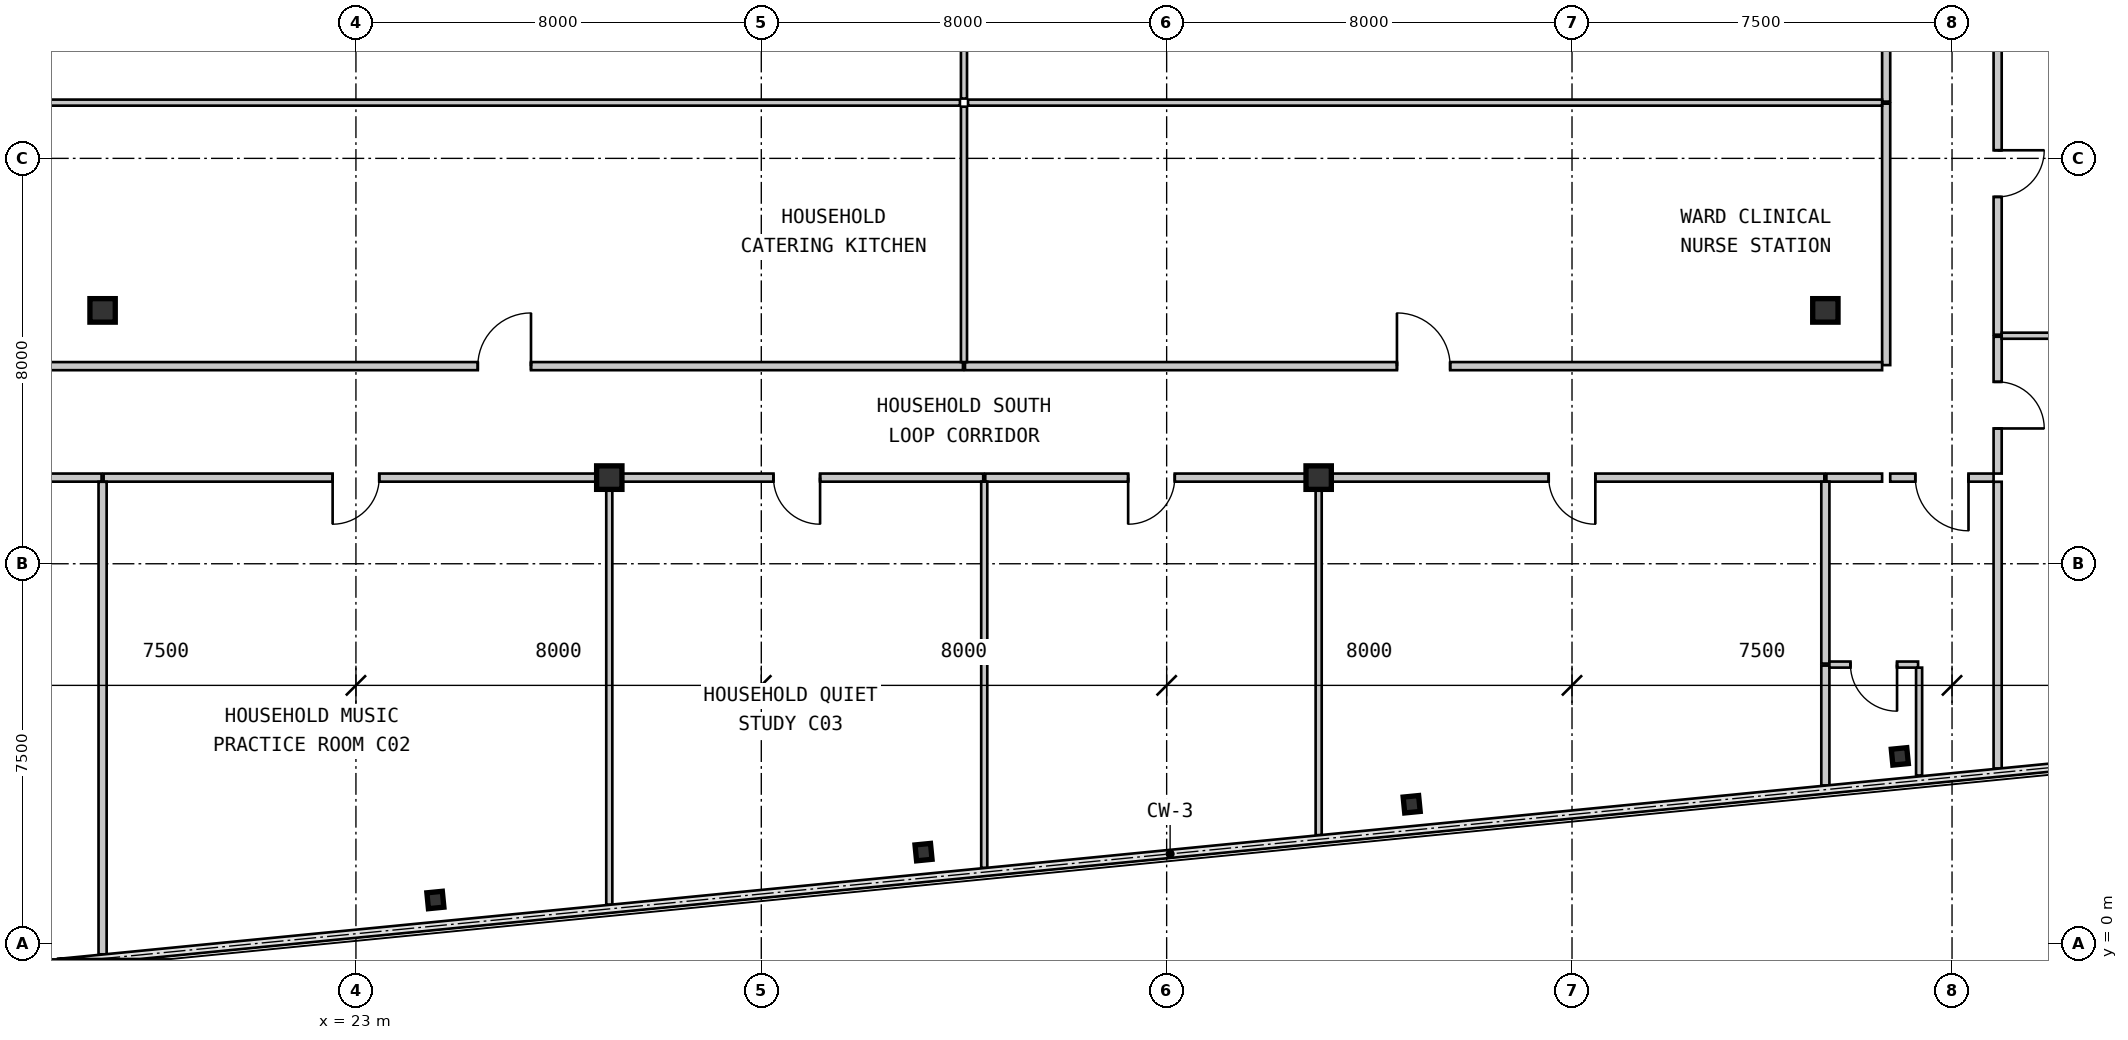
"""IFC4 building model, lengths in metres.
Left out: names, types, materials, properties, quantities, classifications, styles, units other than length and angle.
Written with IfcOpenShell. Run it as: python <this file> out.ifc"""

import sys

from ifc_helpers import new_model, si_unit, direction, frame, frame_2d, origin, origin_2d, place, context, subcontext, project, spatial, rectangle, i_section, extrude, source, transform, mapped, element, fill, save


model = new_model("IFC4")
c1 = context("Model", 3, precision=1e-05, world=origin(), true_north=direction((0.0, 1.0)))
c2 = subcontext(c1, "Body", "Model", "MODEL_VIEW")
j1 = project(units=[si_unit("LENGTHUNIT", "METRE"), si_unit("PLANEANGLEUNIT", "RADIAN")], contexts=[c1])
p1 = place(None, origin())
s1 = spatial("IfcSite", under=j1, at=p1, CompositionType="ELEMENT")
p2 = place(p1, origin())
s2 = spatial("IfcBuilding", under=s1, at=p2, CompositionType="ELEMENT")
p3 = place(p2, frame((0.0, 0.0, 74.55)))
s3 = spatial("IfcBuildingStorey", under=s2, at=p3, CompositionType="ELEMENT", Elevation=74.55)
m1 = source(origin(), c2, "Body", "SweptSolid", [
    extrude(i_section(OverallWidth=0.5, OverallDepth=0.464, WebThickness=0.022, FlangeThickness=0.034, at=origin_2d()), origin(), (0.0, 0.0, 1.0), 3.15),
])
for number, where, z_axis, x_axis in (
    (1, (28.0, 9.2, 0.0), (0.0, 0.0, 1.0), (1.0, 0.0, 0.0)),
    (2, (42.0, 9.2, 0.0), (0.0, 0.0, 1.0), (1.0, 0.0, 0.0)),
    (3, (18.0, 12.5, 0.0), (0.0, 0.0, 1.0), (1.0, 0.0, 0.0)),
    (4, (52.0, 12.5, 0.0), (0.0, 0.0, 1.0), (1.0, 0.0, 0.0)),
):
    element("IfcColumn", number, at=place(p3, frame(where, z_axis=z_axis, x_axis=x_axis)), inside=s3, PredefinedType="COLUMN", context=c2, shape_type="MappedRepresentation", body=[
        mapped(m1, transform((0.0, 0.0, 0.0), scale=1.0)),
    ])
m2 = source(origin(), c2, "Body", "SweptSolid", [
    extrude(i_section(OverallWidth=0.307, OverallDepth=0.315, WebThickness=0.012, FlangeThickness=0.019, at=origin_2d()), origin(), (0.0, 0.0, 1.0), 3.15),
])
for number, where, z_axis, x_axis in (
    (5, (24.568, 0.865, 0.0), (0.0, 0.0, 1.0), (0.995, 0.098, 0.0)),
    (6, (34.202, 1.809, 0.0), (0.0, 0.0, 1.0), (0.995, 0.098, 0.0)),
    (7, (43.835, 2.754, 0.0), (0.0, 0.0, 1.0), (0.995, 0.098, 0.0)),
    (8, (53.469, 3.698, 0.0), (0.0, 0.0, 1.0), (0.995, 0.098, 0.0)),
):
    element("IfcColumn", number, at=place(p3, frame(where, z_axis=z_axis, x_axis=x_axis)), inside=s3, PredefinedType="COLUMN", context=c2, shape_type="MappedRepresentation", body=[
        mapped(m2, transform((0.0, 0.0, 0.0), scale=1.0)),
    ])
m3 = source(origin(), c2, "Body", "SweptSolid", [
    extrude(rectangle(XDim=5.16, YDim=0.16, at=frame_2d((2.58, 0.0))), origin(), (0.0, 0.0, 1.0), 2.93),
])
p4 = place(p3, frame((53.2, 11.42, 0.0), z_axis=(0.0, 0.0, 1.0), x_axis=(0.0, 1.0, 0.0)))
e9 = element("IfcWall", 9, at=p4, inside=s3, PredefinedType="PARTITIONING", context=c2, shape_type="MappedRepresentation", body=[
    mapped(m3, transform((0.0, 0.0, 0.0), scale=1.0)),
])
m4 = source(origin(), c2, "Body", "SweptSolid", [
    extrude(rectangle(XDim=5.1, YDim=0.16, at=frame_2d((2.55, 0.0))), origin(), (0.0, 0.0, 1.0), 2.93),
])
p5 = place(p3, frame((53.2, 16.62, 0.0), z_axis=(0.0, 0.0, 1.0), x_axis=(0.0, 1.0, 0.0)))
e10 = element("IfcWall", 10, at=p5, inside=s3, PredefinedType="PARTITIONING", context=c2, shape_type="MappedRepresentation", body=[
    mapped(m4, transform((0.0, 0.0, 0.0), scale=1.0)),
])
m5 = source(origin(), c2, "Body", "SweptSolid", [
    extrude(rectangle(XDim=2.04, YDim=0.16, at=frame_2d((1.02, 0.0))), origin(), (0.0, 0.0, 1.0), 2.93),
])
p6 = place(p3, frame((55.32, 9.2, 0.0), z_axis=(0.0, 0.0, 1.0), x_axis=(-1.0, 0.0, 0.0)))
e11 = element("IfcWall", 11, at=p6, inside=s3, PredefinedType="PARTITIONING", context=c2, shape_type="MappedRepresentation", body=[
    mapped(m5, transform((0.0, 0.0, 0.0), scale=1.0)),
])
m6 = source(origin(), c2, "Body", "SweptSolid", [
    extrude(rectangle(XDim=1.05, YDim=2.1, at=frame_2d((0.525, 1.05))), frame((0.0, 0.09, 0.0), z_axis=(0.0, -1.0, 0.0), x_axis=(1.0, 0.0, 0.0)), (0.0, 0.0, 1.0), 0.18),
])
p7 = place(p6, frame((0.495, 0.0, 0.0)))
e12 = element("IfcOpeningElement", 12, at=p7, cuts=e11, PredefinedType="OPENING", context=c2, shape_type="MappedRepresentation", body=[
    mapped(m6, transform((0.0, 0.0, 0.0), scale=1.0)),
])
m7 = source(origin(), c2, "Body", "SweptSolid", [
    extrude(rectangle(XDim=2.7, YDim=0.16, at=frame_2d((1.35, 0.0))), origin(), (0.0, 0.0, 1.0), 2.93),
])
p8 = place(p3, frame((55.4, 11.98, 0.0), z_axis=(0.0, 0.0, 1.0), x_axis=(0.0, -1.0, 0.0)))
e13 = element("IfcWall", 13, at=p8, inside=s3, PredefinedType="PARTITIONING", context=c2, shape_type="MappedRepresentation", body=[
    mapped(m7, transform((0.0, 0.0, 0.0), scale=1.0)),
])
m8 = source(origin(), c2, "Body", "SweptSolid", [
    extrude(rectangle(XDim=0.92, YDim=2.1, at=frame_2d((0.46, 1.05))), frame((0.0, 0.09, 0.0), z_axis=(0.0, -1.0, 0.0), x_axis=(1.0, 0.0, 0.0)), (0.0, 0.0, 1.0), 0.18),
])
p9 = place(p8, frame((0.89, 0.0, 0.0)))
e14 = element("IfcOpeningElement", 14, at=p9, cuts=e13, PredefinedType="OPENING", context=c2, shape_type="MappedRepresentation", body=[
    mapped(m8, transform((0.0, 0.0, 0.0), scale=1.0)),
])
m9 = source(origin(), c2, "Body", "SweptSolid", [
    extrude(rectangle(XDim=6.36, YDim=0.16, at=frame_2d((3.18, 0.0))), origin(), (0.0, 0.0, 1.0), 2.93),
])
p10 = place(p3, frame((55.4, 18.38, 0.0), z_axis=(0.0, 0.0, 1.0), x_axis=(0.0, -1.0, 0.0)))
e15 = element("IfcWall", 15, at=p10, inside=s3, PredefinedType="PARTITIONING", context=c2, shape_type="MappedRepresentation", body=[
    mapped(m9, transform((0.0, 0.0, 0.0), scale=1.0)),
])
p11 = place(p10, frame((2.72, 0.0, 0.0)))
e16 = element("IfcOpeningElement", 16, at=p11, cuts=e15, PredefinedType="OPENING", context=c2, shape_type="MappedRepresentation", body=[
    mapped(m8, transform((0.0, 0.0, 0.0), scale=1.0)),
])
m10 = source(origin(), c2, "Body", "SweptSolid", [
    extrude(rectangle(XDim=18.1, YDim=0.16, at=frame_2d((9.05, 0.0))), origin(), (0.0, 0.0, 1.0), 2.93),
])
p12 = place(p3, frame((16.88, 11.4, 0.0), z_axis=(0.0, 0.0, 1.0), x_axis=(1.0, 0.0, 0.0)))
e17 = element("IfcWall", 17, at=p12, inside=s3, PredefinedType="PARTITIONING", context=c2, shape_type="MappedRepresentation", body=[
    mapped(m10, transform((0.0, 0.0, 0.0), scale=1.0)),
])
p13 = place(p12, frame((8.525, 0.0, 0.0)))
e18 = element("IfcOpeningElement", 18, at=p13, cuts=e17, PredefinedType="OPENING", context=c2, shape_type="MappedRepresentation", body=[
    mapped(m6, transform((0.0, 0.0, 0.0), scale=1.0)),
])
p14 = place(p3, frame((35.02, 11.4, 0.0), z_axis=(0.0, 0.0, 1.0), x_axis=(1.0, 0.0, 0.0)))
e19 = element("IfcWall", 19, at=p14, inside=s3, PredefinedType="PARTITIONING", context=c2, shape_type="MappedRepresentation", body=[
    mapped(m10, transform((0.0, 0.0, 0.0), scale=1.0)),
])
p15 = place(p14, frame((8.525, 0.0, 0.0)))
e20 = element("IfcOpeningElement", 20, at=p15, cuts=e19, PredefinedType="OPENING", context=c2, shape_type="MappedRepresentation", body=[
    mapped(m6, transform((0.0, 0.0, 0.0), scale=1.0)),
])
m11 = source(origin(), c2, "Body", "SweptSolid", [
    extrude(rectangle(XDim=1.1, YDim=0.16, at=frame_2d((0.55, 0.0))), origin(), (0.0, 0.0, 1.0), 2.93),
])
p16 = place(p3, frame((17.98, 9.2, 0.0), z_axis=(0.0, 0.0, 1.0), x_axis=(-1.0, 0.0, 0.0)))
e21 = element("IfcWall", 21, at=p16, inside=s3, PredefinedType="PARTITIONING", context=c2, shape_type="MappedRepresentation", body=[
    mapped(m11, transform((0.0, 0.0, 0.0), scale=1.0)),
])
m12 = source(origin(), c2, "Body", "SweptSolid", [
    extrude(rectangle(XDim=9.959, YDim=0.16, at=frame_2d((4.98, 0.0))), origin(), (0.0, 0.0, 1.0), 2.93),
])
p17 = place(p3, frame((27.98, 9.2, 0.0), z_axis=(0.0, 0.0, 1.0), x_axis=(-1.0, 0.0, 0.0)))
e22 = element("IfcWall", 22, at=p17, inside=s3, PredefinedType="PARTITIONING", context=c2, shape_type="MappedRepresentation", body=[
    mapped(m12, transform((0.0, 0.0, 0.0), scale=1.0)),
])
p18 = place(p17, frame((4.52, 0.0, 0.0)))
e23 = element("IfcOpeningElement", 23, at=p18, cuts=e22, PredefinedType="OPENING", context=c2, shape_type="MappedRepresentation", body=[
    mapped(m8, transform((0.0, 0.0, 0.0), scale=1.0)),
])
m13 = source(origin(), c2, "Body", "SweptSolid", [
    extrude(rectangle(XDim=7.36, YDim=0.16, at=frame_2d((3.68, 0.0))), origin(), (0.0, 0.0, 1.0), 2.328),
])
p19 = place(p3, frame((35.38, 9.2, 0.0), z_axis=(0.0, 0.0, 1.0), x_axis=(-1.0, 0.0, 0.0)))
e24 = element("IfcWall", 24, at=p19, inside=s3, PredefinedType="PARTITIONING", context=c2, shape_type="MappedRepresentation", body=[
    mapped(m13, transform((0.0, 0.0, 0.0), scale=1.0)),
])
p20 = place(p19, frame((3.22, 0.0, 0.0)))
e25 = element("IfcOpeningElement", 25, at=p20, cuts=e24, PredefinedType="OPENING", context=c2, shape_type="MappedRepresentation", body=[
    mapped(m8, transform((0.0, 0.0, 0.0), scale=1.0)),
])
m14 = source(origin(), c2, "Body", "SweptSolid", [
    extrude(rectangle(XDim=6.56, YDim=0.16, at=frame_2d((3.28, 0.0))), origin(), (0.0, 0.0, 1.0), 2.328),
])
p21 = place(p3, frame((41.98, 9.2, 0.0), z_axis=(0.0, 0.0, 1.0), x_axis=(-1.0, 0.0, 0.0)))
e26 = element("IfcWall", 26, at=p21, inside=s3, PredefinedType="PARTITIONING", context=c2, shape_type="MappedRepresentation", body=[
    mapped(m14, transform((0.0, 0.0, 0.0), scale=1.0)),
])
p22 = place(p21, frame((2.82, 0.0, 0.0)))
e27 = element("IfcOpeningElement", 27, at=p22, cuts=e26, PredefinedType="OPENING", context=c2, shape_type="MappedRepresentation", body=[
    mapped(m8, transform((0.0, 0.0, 0.0), scale=1.0)),
])
p23 = place(p3, frame((51.98, 9.2, 0.0), z_axis=(0.0, 0.0, 1.0), x_axis=(-1.0, 0.0, 0.0)))
e28 = element("IfcWall", 28, at=p23, inside=s3, PredefinedType="PARTITIONING", context=c2, shape_type="MappedRepresentation", body=[
    mapped(m12, transform((0.0, 0.0, 0.0), scale=1.0)),
])
p24 = place(p23, frame((4.52, 0.0, 0.0)))
e29 = element("IfcOpeningElement", 29, at=p24, cuts=e28, PredefinedType="OPENING", context=c2, shape_type="MappedRepresentation", body=[
    mapped(m8, transform((0.0, 0.0, 0.0), scale=1.0)),
])
p25 = place(p3, frame((53.12, 9.2, 0.0), z_axis=(0.0, 0.0, 1.0), x_axis=(-1.0, 0.0, 0.0)))
e30 = element("IfcWall", 30, at=p25, inside=s3, PredefinedType="PARTITIONING", context=c2, shape_type="MappedRepresentation", body=[
    mapped(m11, transform((0.0, 0.0, 0.0), scale=1.0)),
])
m15 = source(origin(), c2, "Body", "SweptSolid", [
    extrude(rectangle(XDim=18.04, YDim=0.12, at=frame_2d((9.02, 0.0))), origin(), (0.0, 0.0, 1.0), 2.93),
])
p26 = place(p3, frame((16.88, 16.6, 0.0), z_axis=(0.0, 0.0, 1.0), x_axis=(1.0, 0.0, 0.0)))
e31 = element("IfcWall", 31, at=p26, inside=s3, PredefinedType="PARTITIONING", context=c2, shape_type="MappedRepresentation", body=[
    mapped(m15, transform((0.0, 0.0, 0.0), scale=1.0)),
])
m16 = source(origin(), c2, "Body", "SweptSolid", [
    extrude(rectangle(XDim=5.04, YDim=0.12, at=frame_2d((2.52, 0.0))), origin(), (0.0, 0.0, 1.0), 2.93),
])
for number, where, z_axis, x_axis in (
    (32, (35.0, 16.52, 0.0), (0.0, 0.0, 1.0), (0.0, -1.0, 0.0)),
    (33, (35.0, 21.72, 0.0), (0.0, 0.0, 1.0), (0.0, -1.0, 0.0)),
):
    element("IfcWall", number, at=place(p3, frame(where, z_axis=z_axis, x_axis=x_axis)), inside=s3, PredefinedType="PARTITIONING", context=c2, shape_type="MappedRepresentation", body=[
        mapped(m16, transform((0.0, 0.0, 0.0), scale=1.0)),
    ])
p27 = place(p3, frame((35.08, 16.6, 0.0), z_axis=(0.0, 0.0, 1.0), x_axis=(1.0, 0.0, 0.0)))
e34 = element("IfcWall", 34, at=p27, inside=s3, PredefinedType="PARTITIONING", context=c2, shape_type="MappedRepresentation", body=[
    mapped(m15, transform((0.0, 0.0, 0.0), scale=1.0)),
])
m17 = source(origin(), c2, "Body", "SweptSolid", [
    extrude(rectangle(XDim=9.325, YDim=0.16, at=frame_2d((4.663, 0.0))), origin(), (0.0, 0.0, 1.0), 2.93),
])
p28 = place(p3, frame((18.0, 9.118, 0.0), z_axis=(0.0, 0.0, 1.0), x_axis=(0.0, -1.0, 0.0)))
e35 = element("IfcWall", 35, at=p28, inside=s3, PredefinedType="PARTITIONING", context=c2, shape_type="MappedRepresentation", body=[
    mapped(m17, transform((0.0, 0.0, 0.0), scale=1.0)),
])
m18 = source(origin(), c2, "Body", "SweptSolid", [
    extrude(rectangle(XDim=8.349, YDim=0.12, at=frame_2d((4.174, 0.0))), origin(), (0.0, 0.0, 1.0), 2.93),
])
p29 = place(p3, frame((28.0, 9.12, 0.0), z_axis=(0.0, 0.0, 1.0), x_axis=(0.0, -1.0, 0.0)))
e36 = element("IfcWall", 36, at=p29, inside=s3, PredefinedType="PARTITIONING", context=c2, shape_type="MappedRepresentation", body=[
    mapped(m18, transform((0.0, 0.0, 0.0), scale=1.0)),
])
m19 = source(origin(), c2, "Body", "SweptSolid", [
    extrude(rectangle(XDim=7.623, YDim=0.12, at=frame_2d((3.812, 0.0))), origin(), (0.0, 0.0, 1.0), 2.93),
])
p30 = place(p3, frame((35.4, 9.12, 0.0), z_axis=(0.0, 0.0, 1.0), x_axis=(0.0, -1.0, 0.0)))
e37 = element("IfcWall", 37, at=p30, inside=s3, PredefinedType="PARTITIONING", context=c2, shape_type="MappedRepresentation", body=[
    mapped(m19, transform((0.0, 0.0, 0.0), scale=1.0)),
])
m20 = source(origin(), c2, "Body", "SweptSolid", [
    extrude(rectangle(XDim=6.976, YDim=0.12, at=frame_2d((3.488, 0.0))), origin(), (0.0, 0.0, 1.0), 2.93),
])
p31 = place(p3, frame((42.0, 9.12, 0.0), z_axis=(0.0, 0.0, 1.0), x_axis=(0.0, -1.0, 0.0)))
e38 = element("IfcWall", 38, at=p31, inside=s3, PredefinedType="PARTITIONING", context=c2, shape_type="MappedRepresentation", body=[
    mapped(m20, transform((0.0, 0.0, 0.0), scale=1.0)),
])
m21 = source(origin(), c2, "Body", "SweptSolid", [
    extrude(rectangle(XDim=3.59, YDim=0.16, at=frame_2d((1.795, 0.0))), origin(), (0.0, 0.0, 1.0), 2.93),
])
p32 = place(p3, frame((52.0, 9.12, 0.0), z_axis=(0.0, 0.0, 1.0), x_axis=(0.0, -1.0, 0.0)))
e39 = element("IfcWall", 39, at=p32, inside=s3, PredefinedType="PARTITIONING", context=c2, shape_type="MappedRepresentation", body=[
    mapped(m21, transform((0.0, 0.0, 0.0), scale=1.0)),
])
m22 = source(origin(), c2, "Body", "SweptSolid", [
    extrude(rectangle(XDim=2.365, YDim=0.16, at=frame_2d((1.183, 0.0))), origin(), (0.0, 0.0, 1.0), 2.93),
])
p33 = place(p3, frame((52.0, 5.49, 0.0), z_axis=(0.0, 0.0, 1.0), x_axis=(0.0, -1.0, 0.0)))
e40 = element("IfcWall", 40, at=p33, inside=s3, PredefinedType="PARTITIONING", context=c2, shape_type="MappedRepresentation", body=[
    mapped(m22, transform((0.0, 0.0, 0.0), scale=1.0)),
])
m23 = source(origin(), c2, "Body", "SweptSolid", [
    extrude(rectangle(XDim=2.128, YDim=0.12, at=frame_2d((1.064, 0.0))), origin(), (0.0, 0.0, 1.0), 2.93),
])
p34 = place(p3, frame((53.85, 3.322, 0.0), z_axis=(0.0, 0.0, 1.0), x_axis=(0.0, 1.0, 0.0)))
e41 = element("IfcWall", 41, at=p34, inside=s3, PredefinedType="PARTITIONING", context=c2, shape_type="MappedRepresentation", body=[
    mapped(m23, transform((0.0, 0.0, 0.0), scale=1.0)),
])
m24 = source(origin(), c2, "Body", "SweptSolid", [
    extrude(rectangle(XDim=1.75, YDim=0.12, at=frame_2d((0.875, 0.0))), origin(), (0.0, 0.0, 1.0), 2.93),
])
p35 = place(p3, frame((53.83, 5.51, 0.0), z_axis=(0.0, 0.0, 1.0), x_axis=(-1.0, 0.0, 0.0)))
e42 = element("IfcWall", 42, at=p35, inside=s3, PredefinedType="PARTITIONING", context=c2, shape_type="MappedRepresentation", body=[
    mapped(m24, transform((0.0, 0.0, 0.0), scale=1.0)),
])
m25 = source(origin(), c2, "Body", "SweptSolid", [
    extrude(rectangle(XDim=0.92, YDim=2.1, at=frame_2d((0.46, 1.05))), frame((0.0, 0.07, 0.0), z_axis=(0.0, -1.0, 0.0), x_axis=(1.0, 0.0, 0.0)), (0.0, 0.0, 1.0), 0.14),
])
p36 = place(p35, frame((0.415, 0.0, 0.0)))
e43 = element("IfcOpeningElement", 43, at=p36, cuts=e42, PredefinedType="OPENING", context=c2, shape_type="MappedRepresentation", body=[
    mapped(m25, transform((0.0, 0.0, 0.0), scale=1.0)),
])
m26 = source(origin(), c2, "Body", "SweptSolid", [
    extrude(rectangle(XDim=5.658, YDim=0.16, at=frame_2d((2.829, 0.0))), origin(), (0.0, 0.0, 1.0), 2.93),
])
p37 = place(p3, frame((55.4, 9.118, 0.0), z_axis=(0.0, 0.0, 1.0), x_axis=(0.0, -1.0, 0.0)))
e44 = element("IfcWall", 44, at=p37, inside=s3, PredefinedType="PARTITIONING", context=c2, shape_type="MappedRepresentation", body=[
    mapped(m26, transform((0.0, 0.0, 0.0), scale=1.0)),
])
m27 = source(origin(), c2, "Body", "SweptSolid", [
    extrude(rectangle(XDim=10.497, YDim=0.12, at=frame_2d((5.249, 0.0))), origin(), (0.0, 0.0, 1.0), 2.93),
])
p38 = place(p3, frame((55.48, 12.0, 0.0), z_axis=(0.0, 0.0, 1.0), x_axis=(1.0, 0.0, 0.0)))
e45 = element("IfcWall", 45, at=p38, inside=s3, PredefinedType="PARTITIONING", context=c2, shape_type="MappedRepresentation", body=[
    mapped(m27, transform((0.0, 0.0, 0.0), scale=1.0)),
])
m28 = source(origin(), c2, "Body", "SweptSolid", [
    extrude(rectangle(XDim=1.05, YDim=2.1, at=frame_2d((0.525, 1.05))), frame((0.0, 0.025, 0.0), z_axis=(0.0, -1.0, 0.0), x_axis=(1.0, 0.0, 0.0)), (0.0, 0.0, 1.0), 0.05),
])
p39 = place(p7, origin())
e46 = element("IfcDoor", 46, at=p39, inside=s3, OperationType="SINGLE_SWING_LEFT", PredefinedType="DOOR", context=c2, shape_type="MappedRepresentation", body=[
    mapped(m28, transform((0.0, 0.0, 0.0), scale=1.0)),
])
fill(e12, e46)
m29 = source(origin(), c2, "Body", "SweptSolid", [
    extrude(rectangle(XDim=0.92, YDim=2.1, at=frame_2d((0.46, 1.05))), frame((0.0, 0.025, 0.0), z_axis=(0.0, -1.0, 0.0), x_axis=(1.0, 0.0, 0.0)), (0.0, 0.0, 1.0), 0.05),
])
p40 = place(p9, origin())
e47 = element("IfcDoor", 47, at=p40, inside=s3, OperationType="SINGLE_SWING_RIGHT", PredefinedType="DOOR", context=c2, shape_type="MappedRepresentation", body=[
    mapped(m29, transform((0.0, 0.0, 0.0), scale=1.0)),
])
fill(e14, e47)
p41 = place(p11, origin())
e48 = element("IfcDoor", 48, at=p41, inside=s3, OperationType="SINGLE_SWING_LEFT", PredefinedType="DOOR", context=c2, shape_type="MappedRepresentation", body=[
    mapped(m29, transform((0.0, 0.0, 0.0), scale=1.0)),
])
fill(e16, e48)
p42 = place(p13, origin())
e49 = element("IfcDoor", 49, at=p42, inside=s3, OperationType="SINGLE_SWING_RIGHT", PredefinedType="DOOR", context=c2, shape_type="MappedRepresentation", body=[
    mapped(m28, transform((0.0, 0.0, 0.0), scale=1.0)),
])
fill(e18, e49)
p43 = place(p15, origin())
e50 = element("IfcDoor", 50, at=p43, inside=s3, OperationType="SINGLE_SWING_LEFT", PredefinedType="DOOR", context=c2, shape_type="MappedRepresentation", body=[
    mapped(m28, transform((0.0, 0.0, 0.0), scale=1.0)),
])
fill(e20, e50)
p44 = place(p18, origin())
e51 = element("IfcDoor", 51, at=p44, inside=s3, OperationType="SINGLE_SWING_RIGHT", PredefinedType="DOOR", context=c2, shape_type="MappedRepresentation", body=[
    mapped(m29, transform((0.0, 0.0, 0.0), scale=1.0)),
])
fill(e23, e51)
p45 = place(p20, origin())
e52 = element("IfcDoor", 52, at=p45, inside=s3, OperationType="SINGLE_SWING_LEFT", PredefinedType="DOOR", context=c2, shape_type="MappedRepresentation", body=[
    mapped(m29, transform((0.0, 0.0, 0.0), scale=1.0)),
])
fill(e25, e52)
p46 = place(p22, origin())
e53 = element("IfcDoor", 53, at=p46, inside=s3, OperationType="SINGLE_SWING_RIGHT", PredefinedType="DOOR", context=c2, shape_type="MappedRepresentation", body=[
    mapped(m29, transform((0.0, 0.0, 0.0), scale=1.0)),
])
fill(e27, e53)
p47 = place(p24, origin())
e54 = element("IfcDoor", 54, at=p47, inside=s3, OperationType="SINGLE_SWING_LEFT", PredefinedType="DOOR", context=c2, shape_type="MappedRepresentation", body=[
    mapped(m29, transform((0.0, 0.0, 0.0), scale=1.0)),
])
fill(e29, e54)
p48 = place(p36, origin())
e55 = element("IfcDoor", 55, at=p48, inside=s3, OperationType="SINGLE_SWING_LEFT", PredefinedType="DOOR", context=c2, shape_type="MappedRepresentation", body=[
    mapped(m29, transform((0.0, 0.0, 0.0), scale=1.0)),
])
fill(e43, e55)
save(model, sys.argv[1])
